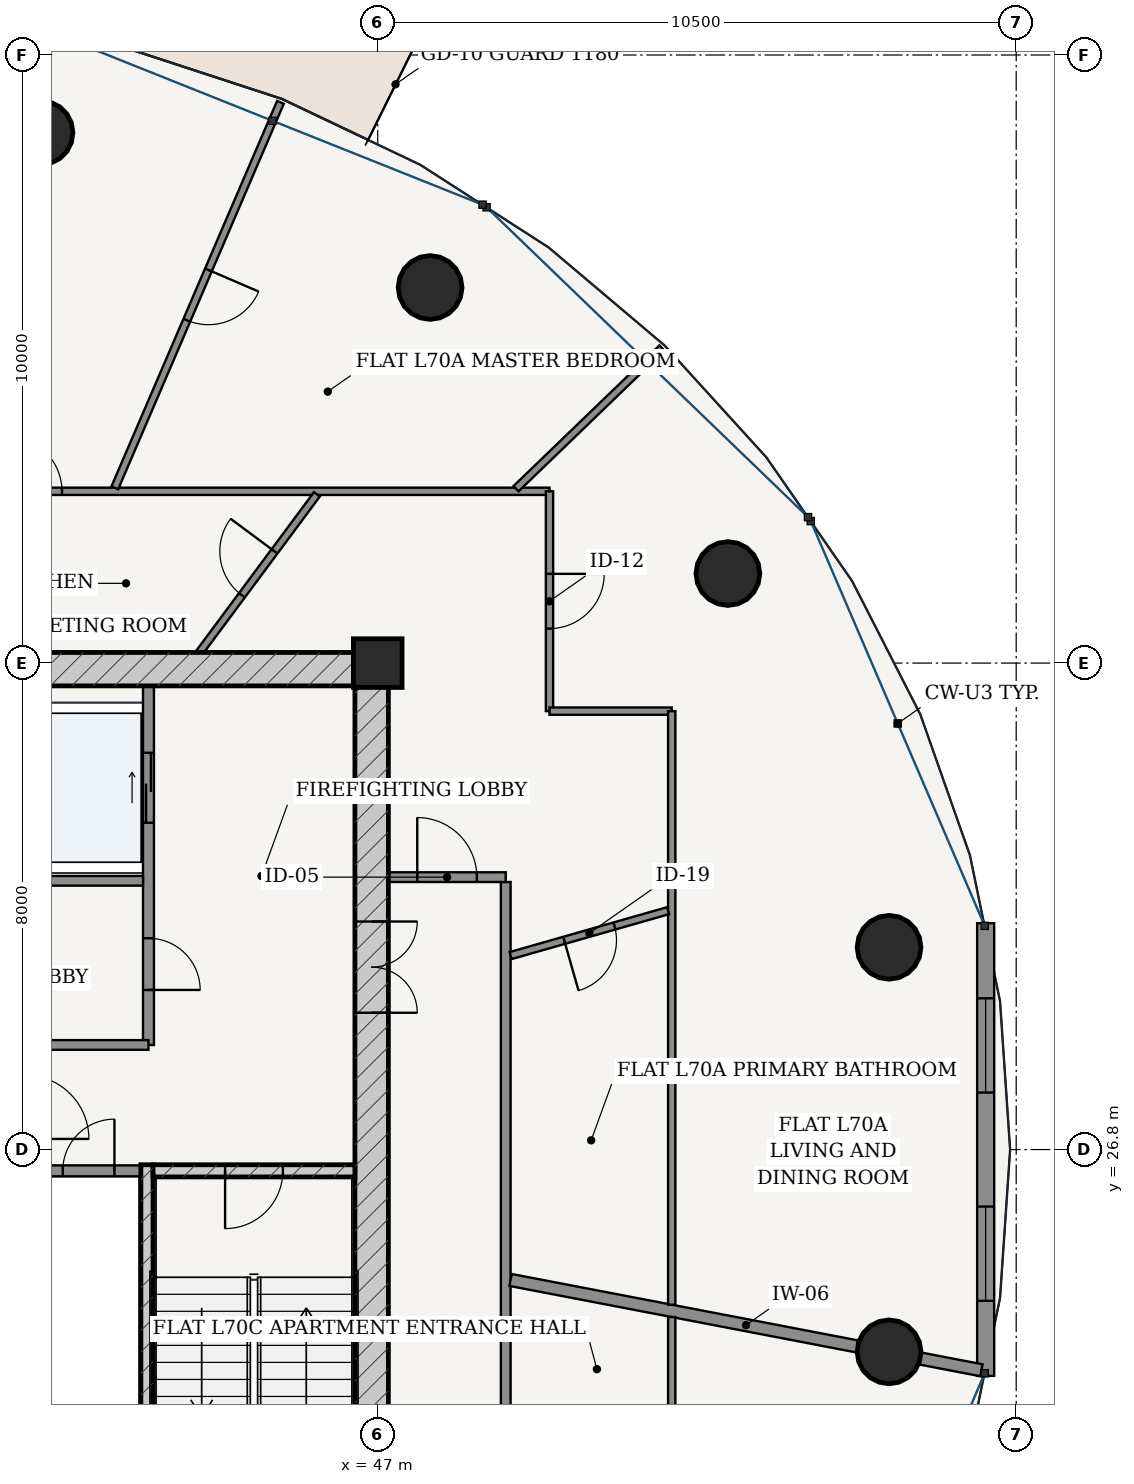
"""IFC4 building model, lengths in metres.
Left out: names, types, materials, properties, quantities, classifications, styles, units other than length and angle.
Written with IfcOpenShell. Run it as: python <this file> out.ifc"""

import sys

from ifc_helpers import new_model, si_unit, direction, frame, frame_2d, origin, origin_2d, place, context, subcontext, project, spatial, rectangle, hollow_circle, extrude, source, transform, mapped, element, fill, save


model = new_model("IFC4")
c1 = context("Model", 3, precision=1e-05, world=origin(), true_north=direction((-0.2419218956, 0.970295726276)))
c2 = subcontext(c1, "Body", "Model", "MODEL_VIEW")
j1 = project(units=[si_unit("LENGTHUNIT", "METRE"), si_unit("PLANEANGLEUNIT", "RADIAN")], contexts=[c1])
p1 = place(None, origin())
s1 = spatial("IfcSite", under=j1, at=p1, CompositionType="ELEMENT")
p2 = place(p1, origin())
s2 = spatial("IfcBuilding", under=s1, at=p2, CompositionType="ELEMENT")
p3 = place(p2, frame((0.0, 0.0, 266.95)))
s3 = spatial("IfcBuildingStorey", under=s2, at=p3, CompositionType="ELEMENT", Elevation=266.95)
p4 = place(p3, frame((47.0, 34.8, 0.0), z_axis=(0.0, 0.0, 1.0), x_axis=(1.0, 0.0, 0.0)))
e1 = element("IfcColumn", 1, at=p4, inside=s3, PredefinedType="COLUMN", context=c2, shape_type="SweptSolid", body=[
    extrude(rectangle(XDim=0.8, YDim=0.8, at=origin_2d()), origin(), (0.0, 0.0, 1.0), 3.75),
])
p5 = place(p3, frame((28.825, 34.7, 0.0), z_axis=(0.0, 0.0, 1.0), x_axis=(1.0, 0.0, 0.0)))
e2 = element("IfcWall", 2, at=p5, inside=s3, PredefinedType="SHEAR", context=c2, shape_type="SweptSolid", body=[
    extrude(rectangle(XDim=18.35, YDim=0.55, at=frame_2d((9.175, 0.0))), origin(), (0.0, 0.0, 1.0), 3.49),
])
p6 = place(p3, frame((46.9, 19.175, 0.0), z_axis=(0.0, 0.0, 1.0), x_axis=(0.0, 1.0, 0.0)))
e3 = element("IfcWall", 3, at=p6, inside=s3, PredefinedType="SHEAR", context=c2, shape_type="SweptSolid", body=[
    extrude(rectangle(XDim=15.25, YDim=0.55, at=frame_2d((7.625, 0.0))), origin(), (0.0, 0.0, 1.0), 3.49),
])
p7 = place(p6, frame((9.875, 0.0, 0.0)))
e4 = element("IfcOpeningElement", 4, at=p7, cuts=e3, PredefinedType="OPENING", context=c2, shape_type="SweptSolid", body=[
    extrude(rectangle(XDim=1.5, YDim=2.2, at=frame_2d((0.75, 1.1))), frame((0.0, 0.285, 0.0), z_axis=(0.0, -1.0, 0.0), x_axis=(1.0, 0.0, 0.0)), (0.0, 0.0, 1.0), 0.57),
])
p8 = place(p3, frame((43.205, 19.175, 0.0), z_axis=(0.0, 0.0, 1.0), x_axis=(0.0, 1.0, 0.0)))
e5 = element("IfcWall", 5, at=p8, inside=s3, PredefinedType="SOLIDWALL", context=c2, shape_type="SweptSolid", body=[
    extrude(rectangle(XDim=7.375, YDim=0.2, at=frame_2d((3.688, 0.0))), origin(), (0.0, 0.0, 1.0), 3.49),
])
p9 = place(p3, frame((43.305, 26.45, 0.0), z_axis=(0.0, 0.0, 1.0), x_axis=(1.0, 0.0, 0.0)))
e6 = element("IfcWall", 6, at=p9, inside=s3, PredefinedType="SOLIDWALL", context=c2, shape_type="SweptSolid", body=[
    extrude(rectangle(XDim=3.32, YDim=0.2, at=frame_2d((1.66, 0.0))), origin(), (0.0, 0.0, 1.0), 3.49),
])
p10 = place(p9, frame((1.185, 0.0, 0.0)))
e7 = element("IfcOpeningElement", 7, at=p10, cuts=e6, PredefinedType="OPENING", context=c2, shape_type="SweptSolid", body=[
    extrude(rectangle(XDim=0.95, YDim=2.15, at=frame_2d((0.475, 1.075))), frame((0.0, 0.11, 0.0), z_axis=(0.0, -1.0, 0.0), x_axis=(1.0, 0.0, 0.0)), (0.0, 0.0, 1.0), 0.22),
])
for number, where, z_axis, x_axis in (
    (8, (55.409, 30.126, 0.0), (0.0, 0.0, 1.0), (1.0, 0.0, 0.0)),
    (9, (52.759, 36.272, 0.0), (0.0, 0.0, 1.0), (1.0, 0.0, 0.0)),
    (10, (47.861, 40.977, 0.0), (0.0, 0.0, 1.0), (1.0, 0.0, 0.0)),
    (11, (41.463, 43.522, 0.0), (0.0, 0.0, 1.0), (1.0, 0.0, 0.0)),
    (12, (55.409, 23.474, 0.0), (0.0, 0.0, 1.0), (1.0, 0.0, 0.0)),
):
    element("IfcColumn", number, at=place(p3, frame(where, z_axis=z_axis, x_axis=x_axis)), inside=s3, PredefinedType="COLUMN", context=c2, shape_type="SweptSolid", body=[
        extrude(hollow_circle(Radius=0.525, WallThickness=0.035, at=origin_2d()), origin(), (0.0, 0.0, 1.0), 3.75),
    ])
p11 = place(p3, frame((56.998, 23.078, 0.0), z_axis=(0.0, 0.0, 1.0), x_axis=(0.0, 1.0, 0.0)))
e13 = element("IfcWall", 13, at=p11, inside=s3, PredefinedType="SOLIDWALL", context=c2, shape_type="SweptSolid", body=[
    extrude(rectangle(XDim=7.445, YDim=0.28, at=frame_2d((3.722, 0.0))), origin(), (0.0, 0.0, 1.0), 3.49),
])
p12 = place(p11, frame((1.235, 0.0, 0.85)))
e14 = element("IfcOpeningElement", 14, at=p12, cuts=e13, PredefinedType="OPENING", context=c2, shape_type="SweptSolid", body=[
    extrude(rectangle(XDim=1.55, YDim=1.95, at=frame_2d((0.775, 0.975))), frame((0.0, 0.15, 0.0), z_axis=(0.0, -1.0, 0.0), x_axis=(1.0, 0.0, 0.0)), (0.0, 0.0, 1.0), 0.3),
])
p13 = place(p11, frame((4.66, 0.0, 0.85)))
e15 = element("IfcOpeningElement", 15, at=p13, cuts=e13, PredefinedType="OPENING", context=c2, shape_type="SweptSolid", body=[
    extrude(rectangle(XDim=1.55, YDim=1.95, at=frame_2d((0.775, 0.975))), frame((0.0, 0.15, 0.0), z_axis=(0.0, -1.0, 0.0), x_axis=(1.0, 0.0, 0.0)), (0.0, 0.0, 1.0), 0.3),
])
p14 = place(p3, frame((41.39, 26.45, 0.0), z_axis=(0.0, 0.0, 1.0), x_axis=(1.0, 0.0, 0.0)))
e16 = element("IfcWall", 16, at=p14, inside=s3, PredefinedType="PARTITIONING", context=c2, shape_type="SweptSolid", body=[
    extrude(rectangle(XDim=1.71, YDim=0.18, at=frame_2d((0.855, 0.0))), origin(), (0.0, 0.0, 1.0), 3.49),
])
p15 = place(p14, frame((0.43, 0.0, 0.0)))
e17 = element("IfcOpeningElement", 17, at=p15, cuts=e16, PredefinedType="OPENING", context=c2, shape_type="SweptSolid", body=[
    extrude(rectangle(XDim=0.85, YDim=2.1, at=frame_2d((0.425, 1.05))), frame((0.0, 0.1, 0.0), z_axis=(0.0, -1.0, 0.0), x_axis=(1.0, 0.0, 0.0)), (0.0, 0.0, 1.0), 0.2),
])
p16 = place(p3, frame((43.23, 28.52, 0.0), z_axis=(0.0, 0.0, 1.0), x_axis=(0.0, 1.0, 0.0)))
e18 = element("IfcWall", 18, at=p16, inside=s3, PredefinedType="PARTITIONING", context=c2, shape_type="SweptSolid", body=[
    extrude(rectangle(XDim=5.905, YDim=0.18, at=frame_2d((2.953, 0.0))), origin(), (0.0, 0.0, 1.0), 3.49),
])
p17 = place(p16, frame((0.905, 0.0, 0.0)))
e19 = element("IfcOpeningElement", 19, at=p17, cuts=e18, PredefinedType="OPENING", context=c2, shape_type="SweptSolid", body=[
    extrude(rectangle(XDim=0.85, YDim=2.1, at=frame_2d((0.425, 1.05))), frame((0.0, 0.1, 0.0), z_axis=(0.0, -1.0, 0.0), x_axis=(1.0, 0.0, 0.0)), (0.0, 0.0, 1.0), 0.2),
])
p18 = place(p16, frame((3.655, 0.0, 0.0)))
e20 = element("IfcOpeningElement", 20, at=p18, cuts=e18, PredefinedType="OPENING", context=c2, shape_type="SweptSolid", body=[
    extrude(rectangle(XDim=1.15, YDim=2.2, at=frame_2d((0.575, 1.1))), frame((0.0, 0.1, 0.0), z_axis=(0.0, -1.0, 0.0), x_axis=(1.0, 0.0, 0.0)), (0.0, 0.0, 1.0), 0.2),
])
p19 = place(p3, frame((41.39, 31.22, 0.0), z_axis=(0.0, 0.0, 1.0), x_axis=(1.0, 0.0, 0.0)))
e21 = element("IfcWall", 21, at=p19, inside=s3, PredefinedType="PARTITIONING", context=c2, shape_type="SweptSolid", body=[
    extrude(rectangle(XDim=1.75, YDim=0.16, at=frame_2d((0.875, 0.0))), origin(), (0.0, 0.0, 1.0), 3.49),
])
p20 = place(p3, frame((41.39, 28.52, 0.0), z_axis=(0.0, 0.0, 1.0), x_axis=(1.0, 0.0, 0.0)))
e22 = element("IfcWall", 22, at=p20, inside=s3, PredefinedType="PARTITIONING", context=c2, shape_type="SweptSolid", body=[
    extrude(rectangle(XDim=1.84, YDim=0.16, at=frame_2d((0.92, 0.0))), origin(), (0.0, 0.0, 1.0), 3.49),
])
p21 = place(p3, frame((49.105, 17.275, 0.0), z_axis=(0.0, 0.0, 1.0), x_axis=(0.0, 1.0, 0.0)))
e23 = element("IfcWall", 23, at=p21, inside=s3, PredefinedType="PARTITIONING", context=c2, shape_type="SweptSolid", body=[
    extrude(rectangle(XDim=13.925, YDim=0.16, at=frame_2d((6.962, 0.0))), origin(), (0.0, 0.0, 1.0), 3.015),
])
p22 = place(p21, frame((3.647, 0.0, 0.0)))
e24 = element("IfcOpeningElement", 24, at=p22, cuts=e23, PredefinedType="OPENING", context=c2, shape_type="SweptSolid", body=[
    extrude(rectangle(XDim=0.98, YDim=2.2, at=frame_2d((0.49, 1.1))), frame((0.0, 0.09, 0.0), z_axis=(0.0, -1.0, 0.0), x_axis=(1.0, 0.0, 0.0)), (0.0, 0.0, 1.0), 0.18),
])
p23 = place(p3, frame((47.175, 31.28, 0.0), z_axis=(0.0, 0.0, 1.0), x_axis=(1.0, 0.0, 0.0)))
e25 = element("IfcWall", 25, at=p23, inside=s3, PredefinedType="PARTITIONING", context=c2, shape_type="SweptSolid", body=[
    extrude(rectangle(XDim=1.93, YDim=0.16, at=frame_2d((0.965, 0.0))), origin(), (0.0, 0.0, 1.0), 3.49),
])
p24 = place(p23, frame((0.475, 0.0, 0.0)))
e26 = element("IfcOpeningElement", 26, at=p24, cuts=e25, PredefinedType="OPENING", context=c2, shape_type="SweptSolid", body=[
    extrude(rectangle(XDim=0.98, YDim=2.2, at=frame_2d((0.49, 1.1))), frame((0.0, 0.09, 0.0), z_axis=(0.0, -1.0, 0.0), x_axis=(1.0, 0.0, 0.0)), (0.0, 0.0, 1.0), 0.18),
])
p25 = place(p3, frame((49.185, 24.656, 0.0), z_axis=(0.0, 0.0, 1.0), x_axis=(0.982109889803, -0.188308694305, 0.0)))
e27 = element("IfcWall", 27, at=p25, inside=s3, PredefinedType="PARTITIONING", context=c2, shape_type="SweptSolid", body=[
    extrude(rectangle(XDim=7.884, YDim=0.2, at=frame_2d((3.942, 0.0))), origin(), (0.0, 0.0, 1.0), 3.015),
])
p26 = place(p3, frame((26.175, 37.625, 0.0), z_axis=(0.0, 0.0, 1.0), x_axis=(1.0, 0.0, 0.0)))
e28 = element("IfcWall", 28, at=p26, inside=s3, PredefinedType="PARTITIONING", context=c2, shape_type="SweptSolid", body=[
    extrude(rectangle(XDim=23.65, YDim=0.12, at=frame_2d((11.825, 0.0))), origin(), (0.0, 0.0, 1.0), 3.015),
])
p27 = place(p26, frame((14.733, 0.0, 0.0)))
e29 = element("IfcOpeningElement", 29, at=p27, cuts=e28, PredefinedType="OPENING", context=c2, shape_type="SweptSolid", body=[
    extrude(rectangle(XDim=0.9, YDim=2.15, at=frame_2d((0.45, 1.075))), frame((0.0, 0.07, 0.0), z_axis=(0.0, -1.0, 0.0), x_axis=(1.0, 0.0, 0.0)), (0.0, 0.0, 1.0), 0.14),
])
p28 = place(p26, frame((11.279, 0.0, 0.0)))
e30 = element("IfcOpeningElement", 30, at=p28, cuts=e28, PredefinedType="OPENING", context=c2, shape_type="SweptSolid", body=[
    extrude(rectangle(XDim=0.9, YDim=2.15, at=frame_2d((0.45, 1.075))), frame((0.0, 0.07, 0.0), z_axis=(0.0, -1.0, 0.0), x_axis=(1.0, 0.0, 0.0)), (0.0, 0.0, 1.0), 0.14),
])
p29 = place(p26, frame((2.678, 0.0, 0.0)))
e31 = element("IfcOpeningElement", 31, at=p29, cuts=e28, PredefinedType="OPENING", context=c2, shape_type="SweptSolid", body=[
    extrude(rectangle(XDim=0.9, YDim=2.15, at=frame_2d((0.45, 1.075))), frame((0.0, 0.07, 0.0), z_axis=(0.0, -1.0, 0.0), x_axis=(1.0, 0.0, 0.0)), (0.0, 0.0, 1.0), 0.14),
])
p30 = place(p3, frame((49.825, 37.625, 0.0), z_axis=(0.0, 0.0, 1.0), x_axis=(0.0, -1.0, 0.0)))
e32 = element("IfcWall", 32, at=p30, inside=s3, PredefinedType="PARTITIONING", context=c2, shape_type="SweptSolid", body=[
    extrude(rectangle(XDim=3.615, YDim=0.12, at=frame_2d((1.808, 0.0))), origin(), (0.0, 0.0, 1.0), 3.015),
])
p31 = place(p30, frame((1.357, 0.0, 0.0)))
e33 = element("IfcOpeningElement", 33, at=p31, cuts=e32, PredefinedType="OPENING", context=c2, shape_type="SweptSolid", body=[
    extrude(rectangle(XDim=0.9, YDim=2.15, at=frame_2d((0.45, 1.075))), frame((0.0, 0.07, 0.0), z_axis=(0.0, -1.0, 0.0), x_axis=(1.0, 0.0, 0.0)), (0.0, 0.0, 1.0), 0.14),
])
p32 = place(p3, frame((49.825, 34.01, 0.0), z_axis=(0.0, 0.0, 1.0), x_axis=(1.0, 0.0, 0.0)))
e34 = element("IfcWall", 34, at=p32, inside=s3, PredefinedType="PARTITIONING", context=c2, shape_type="SweptSolid", body=[
    extrude(rectangle(XDim=2.01, YDim=0.12, at=frame_2d((1.005, 0.0))), origin(), (0.0, 0.0, 1.0), 3.209),
])
p33 = place(p3, frame((51.835, 34.01, 0.0), z_axis=(0.0, 0.0, 1.0), x_axis=(0.0, -1.0, 0.0)))
e35 = element("IfcWall", 35, at=p33, inside=s3, PredefinedType="PARTITIONING", context=c2, shape_type="SweptSolid", body=[
    extrude(rectangle(XDim=9.761, YDim=0.12, at=frame_2d((4.88, 0.0))), origin(), (0.0, 0.0, 1.0), 3.015),
])
p34 = place(p3, frame((49.275, 37.668, 0.0), z_axis=(0.0, 0.0, 1.0), x_axis=(0.719954096891, 0.694021684366, 0.0)))
e36 = element("IfcWall", 36, at=p34, inside=s3, PredefinedType="PARTITIONING", context=c2, shape_type="SweptSolid", body=[
    extrude(rectangle(XDim=3.333, YDim=0.12, at=frame_2d((1.667, 0.0))), origin(), (0.0, 0.0, 1.0), 3.121),
])
p35 = place(p3, frame((42.676, 37.682, 0.0), z_axis=(0.0, 0.0, 1.0), x_axis=(0.394777489933, 0.918776759307, 0.0)))
e37 = element("IfcWall", 37, at=p35, inside=s3, PredefinedType="PARTITIONING", context=c2, shape_type="SweptSolid", body=[
    extrude(rectangle(XDim=6.9, YDim=0.12, at=frame_2d((3.45, 0.0))), origin(), (0.0, 0.0, 1.0), 3.121),
])
p36 = place(p35, frame((3.0, 0.0, 0.0)))
e38 = element("IfcOpeningElement", 38, at=p36, cuts=e37, PredefinedType="OPENING", context=c2, shape_type="SweptSolid", body=[
    extrude(rectangle(XDim=0.9, YDim=2.15, at=frame_2d((0.45, 1.075))), frame((0.0, 0.07, 0.0), z_axis=(0.0, -1.0, 0.0), x_axis=(1.0, 0.0, 0.0)), (0.0, 0.0, 1.0), 0.14),
])
p37 = place(p3, frame((49.185, 29.99, 0.0), z_axis=(0.0, 0.0, 1.0), x_axis=(0.961653809431, 0.274266204273, 0.0)))
e39 = element("IfcWall", 39, at=p37, inside=s3, PredefinedType="PARTITIONING", context=c2, shape_type="SweptSolid", body=[
    extrude(rectangle(XDim=2.694, YDim=0.12, at=frame_2d((1.347, 0.0))), origin(), (0.0, 0.0, 1.0), 3.209),
])
p38 = place(p37, frame((0.917, 0.0, 0.0)))
e40 = element("IfcOpeningElement", 40, at=p38, cuts=e39, PredefinedType="OPENING", context=c2, shape_type="SweptSolid", body=[
    extrude(rectangle(XDim=0.86, YDim=2.15, at=frame_2d((0.43, 1.075))), frame((0.0, 0.07, 0.0), z_axis=(0.0, -1.0, 0.0), x_axis=(1.0, 0.0, 0.0)), (0.0, 0.0, 1.0), 0.14),
])
p39 = place(p3, frame((44.07, 34.977, 0.0), z_axis=(0.0, 0.0, 1.0), x_axis=(0.596033679783, 0.802959433947, 0.0)))
e41 = element("IfcWall", 41, at=p39, inside=s3, PredefinedType="PARTITIONING", context=c2, shape_type="SweptSolid", body=[
    extrude(rectangle(XDim=3.236, YDim=0.12, at=frame_2d((1.618, 0.0))), origin(), (0.0, 0.0, 1.0), 3.49),
])
p40 = place(p39, frame((1.168, 0.0, 0.0)))
e42 = element("IfcOpeningElement", 42, at=p40, cuts=e41, PredefinedType="OPENING", context=c2, shape_type="SweptSolid", body=[
    extrude(rectangle(XDim=0.9, YDim=2.15, at=frame_2d((0.45, 1.075))), frame((0.0, 0.07, 0.0), z_axis=(0.0, -1.0, 0.0), x_axis=(1.0, 0.0, 0.0)), (0.0, 0.0, 1.0), 0.14),
])
p41 = place(p3, frame((51.835, 24.045, 0.0), z_axis=(0.0, 0.0, 1.0), x_axis=(0.0, -1.0, 0.0)))
e43 = element("IfcWall", 43, at=p41, inside=s3, PredefinedType="PARTITIONING", context=c2, shape_type="SweptSolid", body=[
    extrude(rectangle(XDim=9.58, YDim=0.12, at=frame_2d((4.79, 0.0))), origin(), (0.0, 0.0, 1.0), 3.015),
])
p42 = place(p41, frame((2.771, 0.0, 0.0)))
e44 = element("IfcOpeningElement", 44, at=p42, cuts=e43, PredefinedType="OPENING", context=c2, shape_type="SweptSolid", body=[
    extrude(rectangle(XDim=0.9, YDim=2.15, at=frame_2d((0.45, 1.075))), frame((0.0, 0.07, 0.0), z_axis=(0.0, -1.0, 0.0), x_axis=(1.0, 0.0, 0.0)), (0.0, 0.0, 1.0), 0.14),
])
p43 = place(p41, frame((8.073, 0.0, 0.0)))
e45 = element("IfcOpeningElement", 45, at=p43, cuts=e43, PredefinedType="OPENING", context=c2, shape_type="SweptSolid", body=[
    extrude(rectangle(XDim=0.9, YDim=2.15, at=frame_2d((0.45, 1.075))), frame((0.0, 0.07, 0.0), z_axis=(0.0, -1.0, 0.0), x_axis=(1.0, 0.0, 0.0)), (0.0, 0.0, 1.0), 0.14),
])
m1 = source(origin(), c2, "Body", "SweptSolid", [
    extrude(rectangle(XDim=1.55, YDim=1.95, at=frame_2d((0.775, 0.975))), frame((0.0, 0.03, 0.0), z_axis=(0.0, -1.0, 0.0), x_axis=(1.0, 0.0, 0.0)), (0.0, 0.0, 1.0), 0.06),
])
p44 = place(p12, origin())
e46 = element("IfcWindow", 46, at=p44, inside=s3, PartitioningType="SINGLE_PANEL", PredefinedType="WINDOW", context=c2, shape_type="MappedRepresentation", body=[
    mapped(m1, transform((0.0, 0.0, 0.0), scale=1.0)),
])
fill(e14, e46)
p45 = place(p13, origin())
e47 = element("IfcWindow", 47, at=p45, inside=s3, PartitioningType="SINGLE_PANEL", PredefinedType="WINDOW", context=c2, shape_type="MappedRepresentation", body=[
    mapped(m1, transform((0.0, 0.0, 0.0), scale=1.0)),
])
fill(e15, e47)
m2 = source(origin(), c2, "Body", "SweptSolid", [
    extrude(rectangle(XDim=1.5, YDim=2.2, at=frame_2d((0.75, 1.1))), frame((0.0, 0.025, 0.0), z_axis=(0.0, -1.0, 0.0), x_axis=(1.0, 0.0, 0.0)), (0.0, 0.0, 1.0), 0.05),
])
p46 = place(p7, frame((1.5, 0.0, 0.0), z_axis=(0.0, 0.0, 1.0), x_axis=(-1.0, 0.0, 0.0)))
e48 = element("IfcDoor", 48, at=p46, inside=s3, OperationType="DOUBLE_DOOR_SINGLE_SWING", PredefinedType="DOOR", context=c2, shape_type="MappedRepresentation", body=[
    mapped(m2, transform((0.0, 0.0, 0.0), scale=1.0)),
])
fill(e4, e48)
m3 = source(origin(), c2, "Body", "SweptSolid", [
    extrude(rectangle(XDim=0.95, YDim=2.15, at=frame_2d((0.475, 1.075))), frame((0.0, 0.025, 0.0), z_axis=(0.0, -1.0, 0.0), x_axis=(1.0, 0.0, 0.0)), (0.0, 0.0, 1.0), 0.05),
])
p47 = place(p10, frame((0.95, 0.0, 0.0), z_axis=(0.0, 0.0, 1.0), x_axis=(-1.0, 0.0, 0.0)))
e49 = element("IfcDoor", 49, at=p47, inside=s3, OperationType="SINGLE_SWING_RIGHT", PredefinedType="DOOR", context=c2, shape_type="MappedRepresentation", body=[
    mapped(m3, transform((0.0, 0.0, 0.0), scale=1.0)),
])
fill(e7, e49)
m4 = source(origin(), c2, "Body", "SweptSolid", [
    extrude(rectangle(XDim=0.85, YDim=2.1, at=frame_2d((0.425, 1.05))), frame((0.0, 0.025, 0.0), z_axis=(0.0, -1.0, 0.0), x_axis=(1.0, 0.0, 0.0)), (0.0, 0.0, 1.0), 0.05),
])
p48 = place(p15, origin())
e50 = element("IfcDoor", 50, at=p48, inside=s3, OperationType="SINGLE_SWING_RIGHT", PredefinedType="DOOR", context=c2, shape_type="MappedRepresentation", body=[
    mapped(m4, transform((0.0, 0.0, 0.0), scale=1.0)),
])
fill(e17, e50)
p49 = place(p17, frame((0.85, 0.0, 0.0), z_axis=(0.0, 0.0, 1.0), x_axis=(-1.0, 0.0, 0.0)))
e51 = element("IfcDoor", 51, at=p49, inside=s3, OperationType="SINGLE_SWING_RIGHT", PredefinedType="DOOR", context=c2, shape_type="MappedRepresentation", body=[
    mapped(m4, transform((0.0, 0.0, 0.0), scale=1.0)),
])
fill(e19, e51)
m5 = source(origin(), c2, "Body", "SweptSolid", [
    extrude(rectangle(XDim=1.15, YDim=2.2, at=frame_2d((0.575, 1.1))), frame((0.0, 0.025, 0.0), z_axis=(0.0, -1.0, 0.0), x_axis=(1.0, 0.0, 0.0)), (0.0, 0.0, 1.0), 0.05),
])
p50 = place(p18, origin())
e52 = element("IfcDoor", 52, at=p50, inside=s3, OperationType="DOUBLE_DOOR_SLIDING", PredefinedType="DOOR", context=c2, shape_type="MappedRepresentation", body=[
    mapped(m5, transform((0.0, 0.0, 0.0), scale=1.0)),
])
fill(e20, e52)
m6 = source(origin(), c2, "Body", "SweptSolid", [
    extrude(rectangle(XDim=0.98, YDim=2.2, at=frame_2d((0.49, 1.1))), frame((0.0, 0.025, 0.0), z_axis=(0.0, -1.0, 0.0), x_axis=(1.0, 0.0, 0.0)), (0.0, 0.0, 1.0), 0.05),
])
p51 = place(p24, origin())
e53 = element("IfcDoor", 53, at=p51, inside=s3, OperationType="SINGLE_SWING_LEFT", PredefinedType="DOOR", context=c2, shape_type="MappedRepresentation", body=[
    mapped(m6, transform((0.0, 0.0, 0.0), scale=1.0)),
])
fill(e26, e53)
m7 = source(origin(), c2, "Body", "SweptSolid", [
    extrude(rectangle(XDim=0.86, YDim=2.15, at=frame_2d((0.43, 1.075))), frame((0.0, 0.025, 0.0), z_axis=(0.0, -1.0, 0.0), x_axis=(1.0, 0.0, 0.0)), (0.0, 0.0, 1.0), 0.05),
])
p52 = place(p38, frame((0.86, 0.0, 0.0), z_axis=(0.0, 0.0, 1.0), x_axis=(-1.0, 0.0, 0.0)))
e54 = element("IfcDoor", 54, at=p52, inside=s3, OperationType="SINGLE_SWING_RIGHT", PredefinedType="DOOR", context=c2, shape_type="MappedRepresentation", body=[
    mapped(m7, transform((0.0, 0.0, 0.0), scale=1.0)),
])
fill(e40, e54)
m8 = source(origin(), c2, "Body", "SweptSolid", [
    extrude(rectangle(XDim=0.9, YDim=2.15, at=frame_2d((0.45, 1.075))), frame((0.0, 0.025, 0.0), z_axis=(0.0, -1.0, 0.0), x_axis=(1.0, 0.0, 0.0)), (0.0, 0.0, 1.0), 0.05),
])
p53 = place(p31, origin())
e55 = element("IfcDoor", 55, at=p53, inside=s3, OperationType="SINGLE_SWING_LEFT", PredefinedType="DOOR", context=c2, shape_type="MappedRepresentation", body=[
    mapped(m8, transform((0.0, 0.0, 0.0), scale=1.0)),
])
fill(e33, e55)
p54 = place(p40, origin())
e56 = element("IfcDoor", 56, at=p54, inside=s3, OperationType="SINGLE_SWING_RIGHT", PredefinedType="DOOR", context=c2, shape_type="MappedRepresentation", body=[
    mapped(m8, transform((0.0, 0.0, 0.0), scale=1.0)),
])
fill(e42, e56)
p55 = place(p27, origin())
e57 = element("IfcDoor", 57, at=p55, inside=s3, OperationType="SINGLE_SWING_LEFT", PredefinedType="DOOR", context=c2, shape_type="MappedRepresentation", body=[
    mapped(m8, transform((0.0, 0.0, 0.0), scale=1.0)),
])
fill(e29, e57)
p56 = place(p36, frame((0.9, 0.0, 0.0), z_axis=(0.0, 0.0, 1.0), x_axis=(-1.0, 0.0, 0.0)))
e58 = element("IfcDoor", 58, at=p56, inside=s3, OperationType="SINGLE_SWING_LEFT", PredefinedType="DOOR", context=c2, shape_type="MappedRepresentation", body=[
    mapped(m8, transform((0.0, 0.0, 0.0), scale=1.0)),
])
fill(e38, e58)
save(model, sys.argv[1])
